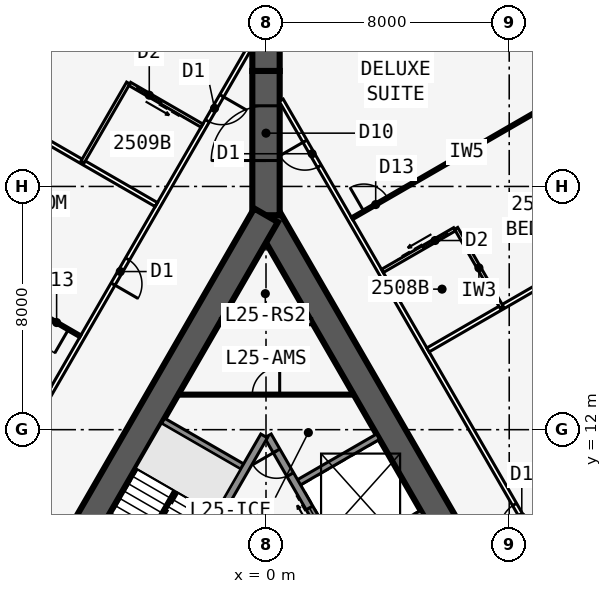
"""IFC4 building model, lengths in metres.
Left out: names, types, materials, properties, quantities, classifications, styles, units other than length and angle.
Written with IfcOpenShell. Run it as: python <this file> out.ifc"""

import sys

from ifc_helpers import new_model, si_unit, direction, frame, frame_2d, origin, place, context, subcontext, project, spatial, rectangle, extrude, element, fill, save


model = new_model("IFC4")
c1 = context("Model", 3, precision=1e-05, world=origin(), true_north=direction((0.0, 1.0)))
c2 = subcontext(c1, "Body", "Model", "MODEL_VIEW")
j1 = project(units=[si_unit("LENGTHUNIT", "METRE"), si_unit("PLANEANGLEUNIT", "RADIAN")], contexts=[c1])
p1 = place(None, origin())
s1 = spatial("IfcSite", under=j1, at=p1, CompositionType="ELEMENT")
p2 = place(p1, origin())
s2 = spatial("IfcBuilding", under=s1, at=p2, CompositionType="ELEMENT")
p3 = place(p2, frame((0.0, 0.0, 96.5)))
s3 = spatial("IfcBuildingStorey", under=s2, at=p3, CompositionType="ELEMENT", Elevation=96.5)
p4 = place(p3, frame((16.5, -9.526, 0.0), z_axis=(0.0, 0.0, 1.0), x_axis=(-0.499999749417, 0.866025548458, 0.0)))
e1 = element("IfcWall", 1, at=p4, inside=s3, PredefinedType="SHEAR", context=c2, shape_type="SweptSolid", body=[
    extrude(rectangle(XDim=33.0, YDim=0.9, at=frame_2d((16.5, 0.0))), origin(), (0.0, 0.0, 1.0), 3.4),
])
p5 = place(p4, frame((14.15, 0.0, 0.0)))
e2 = element("IfcOpeningElement", 2, at=p5, cuts=e1, PredefinedType="OPENING", context=c2, shape_type="SweptSolid", body=[
    extrude(rectangle(XDim=1.8, YDim=2.13, at=frame_2d((0.9, 1.065))), frame((0.0, 0.46, 0.0), z_axis=(0.0, -1.0, 0.0), x_axis=(1.0, 0.0, 0.0)), (0.0, 0.0, 1.0), 0.92),
])
p6 = place(p4, frame((12.6, 0.0, 0.0)))
e3 = element("IfcOpeningElement", 3, at=p6, cuts=e1, PredefinedType="OPENING", context=c2, shape_type="SweptSolid", body=[
    extrude(rectangle(XDim=1.0, YDim=2.13, at=frame_2d((0.5, 1.065))), frame((0.0, 0.46, 0.0), z_axis=(0.0, -1.0, 0.0), x_axis=(1.0, 0.0, 0.0)), (0.0, 0.0, 1.0), 0.92),
])
p7 = place(p3, frame((5.379, 2.586, 0.0), z_axis=(0.0, 0.0, 1.0), x_axis=(-0.500001375892, 0.866024609411, 0.0)))
e4 = element("IfcWall", 4, at=p7, inside=s3, PredefinedType="SOLIDWALL", context=c2, shape_type="SweptSolid", body=[
    extrude(rectangle(XDim=10.633, YDim=0.25, at=frame_2d((5.316, 0.0))), origin(), (0.0, 0.0, 1.0), 3.235),
])
p8 = place(p7, frame((9.164, 0.0, 0.0)))
e5 = element("IfcOpeningElement", 5, at=p8, cuts=e4, PredefinedType="OPENING", context=c2, shape_type="SweptSolid", body=[
    extrude(rectangle(XDim=0.9, YDim=2.13, at=frame_2d((0.45, 1.065))), frame((0.0, 0.135, 0.0), z_axis=(0.0, -1.0, 0.0), x_axis=(1.0, 0.0, 0.0)), (0.0, 0.0, 1.0), 0.27),
])
p9 = place(p7, frame((1.0, 0.0, 0.0)))
e6 = element("IfcOpeningElement", 6, at=p9, cuts=e4, PredefinedType="OPENING", context=c2, shape_type="SweptSolid", body=[
    extrude(rectangle(XDim=1.1, YDim=2.13, at=frame_2d((0.55, 1.065))), frame((0.0, 0.135, 0.0), z_axis=(0.0, -1.0, 0.0), x_axis=(1.0, 0.0, 0.0)), (0.0, 0.0, 1.0), 0.27),
])
p10 = place(p7, frame((3.9, 0.0, 0.0)))
e7 = element("IfcOpeningElement", 7, at=p10, cuts=e4, PredefinedType="OPENING", context=c2, shape_type="SweptSolid", body=[
    extrude(rectangle(XDim=1.1, YDim=2.13, at=frame_2d((0.55, 1.065))), frame((0.0, 0.135, 0.0), z_axis=(0.0, -1.0, 0.0), x_axis=(1.0, 0.0, 0.0)), (0.0, 0.0, 1.0), 0.27),
])
p11 = place(p7, frame((6.8, 0.0, 0.0)))
e8 = element("IfcOpeningElement", 8, at=p11, cuts=e4, PredefinedType="OPENING", context=c2, shape_type="SweptSolid", body=[
    extrude(rectangle(XDim=1.1, YDim=2.13, at=frame_2d((0.55, 1.065))), frame((0.0, 0.135, 0.0), z_axis=(0.0, -1.0, 0.0), x_axis=(1.0, 0.0, 0.0)), (0.0, 0.0, 1.0), 0.27),
])
for number, where, z_axis, x_axis in (
    (9, (2.429, 7.696, 0.0), (0.0, 0.0, 1.0), (0.866, 0.5, 0.0)),
    (10, (0.979, 10.207, 0.0), (0.0, 0.0, 1.0), (0.866, 0.5, 0.0)),
):
    element("IfcWall", number, at=place(p3, frame(where, z_axis=z_axis, x_axis=x_axis)), inside=s3, PredefinedType="SOLIDWALL", context=c2, shape_type="SweptSolid", body=[
        extrude(rectangle(XDim=3.125, YDim=0.2, at=frame_2d((1.562, 0.0))), origin(), (0.0, 0.0, 1.0), 3.235),
    ])
p12 = place(p3, frame((0.0, 19.052, 0.0), z_axis=(0.0, 0.0, 1.0), x_axis=(-0.499999749417, -0.866025548458, 0.0)))
e11 = element("IfcWall", 11, at=p12, inside=s3, PredefinedType="SHEAR", context=c2, shape_type="SweptSolid", body=[
    extrude(rectangle(XDim=33.0, YDim=0.9, at=frame_2d((16.5, 0.0))), origin(), (0.0, 0.0, 1.0), 3.4),
])
p13 = place(p12, frame((14.15, 0.0, 0.0)))
e12 = element("IfcOpeningElement", 12, at=p13, cuts=e11, PredefinedType="OPENING", context=c2, shape_type="SweptSolid", body=[
    extrude(rectangle(XDim=1.8, YDim=2.13, at=frame_2d((0.9, 1.065))), frame((0.0, 0.46, 0.0), z_axis=(0.0, -1.0, 0.0), x_axis=(1.0, 0.0, 0.0)), (0.0, 0.0, 1.0), 0.92),
])
p14 = place(p12, frame((12.6, 0.0, 0.0)))
e13 = element("IfcOpeningElement", 13, at=p14, cuts=e11, PredefinedType="OPENING", context=c2, shape_type="SweptSolid", body=[
    extrude(rectangle(XDim=1.0, YDim=2.13, at=frame_2d((0.5, 1.065))), frame((0.0, 0.46, 0.0), z_axis=(0.0, -1.0, 0.0), x_axis=(1.0, 0.0, 0.0)), (0.0, 0.0, 1.0), 0.92),
])
p15 = place(p3, frame((-0.062, 11.794, 0.0), z_axis=(0.0, 0.0, 1.0), x_axis=(-0.500006680225, -0.86602154692, 0.0)))
e14 = element("IfcWall", 14, at=p15, inside=s3, PredefinedType="SOLIDWALL", context=c2, shape_type="SweptSolid", body=[
    extrude(rectangle(XDim=7.733, YDim=0.25, at=frame_2d((3.866, 0.0))), origin(), (0.0, 0.0, 1.0), 3.235),
])
p16 = place(p3, frame((-0.679, 10.727, 0.0), z_axis=(0.0, 0.0, 1.0), x_axis=(-0.866022959057, 0.500004234368, 0.0)))
e15 = element("IfcWall", 15, at=p16, inside=s3, PredefinedType="SOLIDWALL", context=c2, shape_type="SweptSolid", body=[
    extrude(rectangle(XDim=3.125, YDim=0.2, at=frame_2d((1.562, 0.0))), origin(), (0.0, 0.0, 1.0), 3.235),
])
p17 = place(p3, frame((0.0, 19.052, 0.0), z_axis=(0.0, 0.0, 1.0), x_axis=(0.0, 1.0, 0.0)))
e16 = element("IfcWall", 16, at=p17, inside=s3, PredefinedType="SHEAR", context=c2, shape_type="SweptSolid", body=[
    extrude(rectangle(XDim=4.746, YDim=0.9, at=frame_2d((2.373, 0.0))), origin(), (0.0, 0.0, 1.0), 3.4),
])
p18 = place(p17, frame((1.8, 0.0, 0.0)))
e17 = element("IfcOpeningElement", 17, at=p18, cuts=e16, PredefinedType="OPENING", context=c2, shape_type="SweptSolid", body=[
    extrude(rectangle(XDim=1.8, YDim=2.13, at=frame_2d((0.9, 1.065))), frame((0.0, 0.46, 0.0), z_axis=(0.0, -1.0, 0.0), x_axis=(1.0, 0.0, 0.0)), (0.0, 0.0, 1.0), 0.92),
])
p19 = place(p3, frame((0.0, 23.799, 0.0), z_axis=(0.0, 0.0, 1.0), x_axis=(0.0, 1.0, 0.0)))
e18 = element("IfcWall", 18, at=p19, inside=s3, PredefinedType="SHEAR", context=c2, shape_type="SweptSolid", body=[
    extrude(rectangle(XDim=1.155, YDim=0.9, at=frame_2d((0.577, 0.0))), origin(), (0.0, 0.0, 1.0), 3.4),
])
p20 = place(p3, frame((10.511, 23.357, 0.0), z_axis=(0.0, 0.0, 1.0), x_axis=(-0.682289646561, 0.731081964075, 0.0)))
e19 = element("IfcWall", 19, at=p20, inside=s3, PredefinedType="STANDARD", context=c2, shape_type="SweptSolid", body=[
    extrude(rectangle(XDim=8.211, YDim=0.25, at=frame_2d((4.105, 0.0))), origin(), (0.0, 0.0, 1.0), 3.235),
])
p21 = place(p20, frame((2.006, 0.0, 0.45)))
e20 = element("IfcOpeningElement", 20, at=p21, cuts=e19, PredefinedType="OPENING", context=c2, shape_type="SweptSolid", body=[
    extrude(rectangle(XDim=4.2, YDim=2.4, at=frame_2d((2.1, 1.2))), frame((0.0, 0.135, 0.0), z_axis=(0.0, -1.0, 0.0), x_axis=(1.0, 0.0, 0.0)), (0.0, 0.0, 1.0), 0.27),
])
p22 = place(p3, frame((-4.909, 29.36, 0.0), z_axis=(0.0, 0.0, 1.0), x_axis=(-0.682289646561, -0.731081964075, 0.0)))
e21 = element("IfcWall", 21, at=p22, inside=s3, PredefinedType="STANDARD", context=c2, shape_type="SweptSolid", body=[
    extrude(rectangle(XDim=8.211, YDim=0.25, at=frame_2d((4.105, 0.0))), origin(), (0.0, 0.0, 1.0), 3.235),
])
p23 = place(p22, frame((2.006, 0.0, 0.45)))
e22 = element("IfcOpeningElement", 22, at=p23, cuts=e21, PredefinedType="OPENING", context=c2, shape_type="SweptSolid", body=[
    extrude(rectangle(XDim=4.2, YDim=2.4, at=frame_2d((2.1, 1.2))), frame((0.0, 0.135, 0.0), z_axis=(0.0, -1.0, 0.0), x_axis=(1.0, 0.0, 0.0)), (0.0, 0.0, 1.0), 0.27),
])
p24 = place(p3, frame((20.027, -10.985, 0.0), z_axis=(0.0, 0.0, 1.0), x_axis=(-0.500001677587, 0.866024435227, 0.0)))
e23 = element("IfcWall", 23, at=p24, inside=s3, PredefinedType="PARTITIONING", context=c2, shape_type="SweptSolid", body=[
    extrude(rectangle(XDim=39.054, YDim=0.15, at=frame_2d((19.527, 0.0))), origin(), (0.0, 0.0, 1.0), 3.235),
])
p25 = place(p24, frame((1.558, 0.0, 0.0)))
e24 = element("IfcOpeningElement", 24, at=p25, cuts=e23, PredefinedType="OPENING", context=c2, shape_type="SweptSolid", body=[
    extrude(rectangle(XDim=0.95, YDim=2.13, at=frame_2d((0.475, 1.065))), frame((0.0, 0.085, 0.0), z_axis=(0.0, -1.0, 0.0), x_axis=(1.0, 0.0, 0.0)), (0.0, 0.0, 1.0), 0.17),
])
p26 = place(p24, frame((11.552, 0.0, 0.0)))
e25 = element("IfcOpeningElement", 25, at=p26, cuts=e23, PredefinedType="OPENING", context=c2, shape_type="SweptSolid", body=[
    extrude(rectangle(XDim=0.95, YDim=2.13, at=frame_2d((0.475, 1.065))), frame((0.0, 0.085, 0.0), z_axis=(0.0, -1.0, 0.0), x_axis=(1.0, 0.0, 0.0)), (0.0, 0.0, 1.0), 0.17),
])
p27 = place(p24, frame((22.752, 0.0, 0.0)))
e26 = element("IfcOpeningElement", 26, at=p27, cuts=e23, PredefinedType="OPENING", context=c2, shape_type="SweptSolid", body=[
    extrude(rectangle(XDim=0.95, YDim=2.13, at=frame_2d((0.475, 1.065))), frame((0.0, 0.085, 0.0), z_axis=(0.0, -1.0, 0.0), x_axis=(1.0, 0.0, 0.0)), (0.0, 0.0, 1.0), 0.17),
])
p28 = place(p24, frame((36.546, 0.0, 0.0)))
e27 = element("IfcOpeningElement", 27, at=p28, cuts=e23, PredefinedType="OPENING", context=c2, shape_type="SweptSolid", body=[
    extrude(rectangle(XDim=0.95, YDim=2.13, at=frame_2d((0.475, 1.065))), frame((0.0, 0.085, 0.0), z_axis=(0.0, -1.0, 0.0), x_axis=(1.0, 0.0, 0.0)), (0.0, 0.0, 1.0), 0.17),
])
p29 = place(p3, frame((5.329, 14.623, 0.0), z_axis=(0.0, 0.0, 1.0), x_axis=(0.866018409083, 0.500012114982, 0.0)))
e28 = element("IfcWall", 28, at=p29, inside=s3, PredefinedType="PARTITIONING", context=c2, shape_type="SweptSolid", body=[
    extrude(rectangle(XDim=9.485, YDim=0.15, at=frame_2d((4.742, 0.0))), origin(), (0.0, 0.0, 1.0), 2.389),
])
p30 = place(p3, frame((2.829, 18.954, 0.0), z_axis=(0.0, 0.0, 1.0), x_axis=(0.866020536561, 0.500008430184, 0.0)))
e29 = element("IfcWall", 29, at=p30, inside=s3, PredefinedType="PARTITIONING", context=c2, shape_type="SweptSolid", body=[
    extrude(rectangle(XDim=8.72, YDim=0.1, at=frame_2d((4.36, 0.0))), origin(), (0.0, 0.0, 1.0), 2.389),
])
p31 = place(p30, frame((0.45, 0.0, 0.0)))
e30 = element("IfcOpeningElement", 30, at=p31, cuts=e29, PredefinedType="OPENING", context=c2, shape_type="SweptSolid", body=[
    extrude(rectangle(XDim=0.9, YDim=2.13, at=frame_2d((0.45, 1.065))), frame((0.0, 0.06, 0.0), z_axis=(0.0, -1.0, 0.0), x_axis=(1.0, 0.0, 0.0)), (0.0, 0.0, 1.0), 0.12),
])
p32 = place(p3, frame((7.753, 16.023, 0.0), z_axis=(0.0, 0.0, 1.0), x_axis=(-0.499990139034, 0.866031096941, 0.0)))
e31 = element("IfcWall", 31, at=p32, inside=s3, PredefinedType="PLUMBINGWALL", context=c2, shape_type="SweptSolid", body=[
    extrude(rectangle(XDim=3.0, YDim=0.12, at=frame_2d((1.5, 0.0))), origin(), (0.0, 0.0, 1.0), 3.235),
])
p33 = place(p3, frame((3.829, 17.221, 0.0), z_axis=(0.0, 0.0, 1.0), x_axis=(0.865997131366, 0.500048966069, 0.0)))
e32 = element("IfcWall", 32, at=p33, inside=s3, PredefinedType="PLUMBINGWALL", context=c2, shape_type="SweptSolid", body=[
    extrude(rectangle(XDim=2.74, YDim=0.12, at=frame_2d((1.37, 0.0))), origin(), (0.0, 0.0, 1.0), 3.235),
])
p34 = place(p33, frame((1.55, 0.0, 0.0)))
e33 = element("IfcOpeningElement", 33, at=p34, cuts=e32, PredefinedType="OPENING", context=c2, shape_type="SweptSolid", body=[
    extrude(rectangle(XDim=0.9, YDim=2.13, at=frame_2d((0.45, 1.065))), frame((0.0, 0.07, 0.0), z_axis=(0.0, -1.0, 0.0), x_axis=(1.0, 0.0, 0.0)), (0.0, 0.0, 1.0), 0.14),
])
p35 = place(p3, frame((-0.5, 24.636, 0.0), z_axis=(0.0, 0.0, 1.0), x_axis=(-0.500001915564, -0.86602429783, 0.0)))
e34 = element("IfcWall", 34, at=p35, inside=s3, PredefinedType="PARTITIONING", context=c2, shape_type="SweptSolid", body=[
    extrude(rectangle(XDim=42.172, YDim=0.15, at=frame_2d((21.086, 0.0))), origin(), (0.0, 0.0, 1.0), 3.235),
])
p36 = place(p35, frame((1.911, 0.0, 0.0)))
e35 = element("IfcOpeningElement", 35, at=p36, cuts=e34, PredefinedType="OPENING", context=c2, shape_type="SweptSolid", body=[
    extrude(rectangle(XDim=0.95, YDim=2.13, at=frame_2d((0.475, 1.065))), frame((0.0, 0.085, 0.0), z_axis=(0.0, -1.0, 0.0), x_axis=(1.0, 0.0, 0.0)), (0.0, 0.0, 1.0), 0.17),
])
p37 = place(p35, frame((8.111, 0.0, 0.0)))
e36 = element("IfcOpeningElement", 36, at=p37, cuts=e34, PredefinedType="OPENING", context=c2, shape_type="SweptSolid", body=[
    extrude(rectangle(XDim=0.95, YDim=2.13, at=frame_2d((0.475, 1.065))), frame((0.0, 0.085, 0.0), z_axis=(0.0, -1.0, 0.0), x_axis=(1.0, 0.0, 0.0)), (0.0, 0.0, 1.0), 0.17),
])
p38 = place(p35, frame((18.111, 0.0, 0.0)))
e37 = element("IfcOpeningElement", 37, at=p38, cuts=e34, PredefinedType="OPENING", context=c2, shape_type="SweptSolid", body=[
    extrude(rectangle(XDim=0.95, YDim=2.13, at=frame_2d((0.475, 1.065))), frame((0.0, 0.085, 0.0), z_axis=(0.0, -1.0, 0.0), x_axis=(1.0, 0.0, 0.0)), (0.0, 0.0, 1.0), 0.17),
])
p39 = place(p35, frame((28.711, 0.0, 0.0)))
e38 = element("IfcOpeningElement", 38, at=p39, cuts=e34, PredefinedType="OPENING", context=c2, shape_type="SweptSolid", body=[
    extrude(rectangle(XDim=0.95, YDim=2.13, at=frame_2d((0.475, 1.065))), frame((0.0, 0.085, 0.0), z_axis=(0.0, -1.0, 0.0), x_axis=(1.0, 0.0, 0.0)), (0.0, 0.0, 1.0), 0.17),
])
p40 = place(p35, frame((33.711, 0.0, 0.0)))
e39 = element("IfcOpeningElement", 39, at=p40, cuts=e34, PredefinedType="OPENING", context=c2, shape_type="SweptSolid", body=[
    extrude(rectangle(XDim=0.95, YDim=2.13, at=frame_2d((0.475, 1.065))), frame((0.0, 0.085, 0.0), z_axis=(0.0, -1.0, 0.0), x_axis=(1.0, 0.0, 0.0)), (0.0, 0.0, 1.0), 0.17),
])
p41 = place(p35, frame((39.311, 0.0, 0.0)))
e40 = element("IfcOpeningElement", 40, at=p41, cuts=e34, PredefinedType="OPENING", context=c2, shape_type="SweptSolid", body=[
    extrude(rectangle(XDim=0.95, YDim=2.13, at=frame_2d((0.475, 1.065))), frame((0.0, 0.085, 0.0), z_axis=(0.0, -1.0, 0.0), x_axis=(1.0, 0.0, 0.0)), (0.0, 0.0, 1.0), 0.17),
])
p42 = place(p3, frame((-3.608, 19.404, 0.0), z_axis=(0.0, 0.0, 1.0), x_axis=(-0.866021300503, 0.500007107024, 0.0)))
e41 = element("IfcWall", 41, at=p42, inside=s3, PredefinedType="PARTITIONING", context=c2, shape_type="SweptSolid", body=[
    extrude(rectangle(XDim=7.82, YDim=0.15, at=frame_2d((3.91, 0.0))), origin(), (0.0, 0.0, 1.0), 2.389),
])
p43 = place(p3, frame((-6.108, 15.073, 0.0), z_axis=(0.0, 0.0, 1.0), x_axis=(-0.866031196456, 0.499989966665, 0.0)))
e42 = element("IfcWall", 42, at=p43, inside=s3, PredefinedType="PARTITIONING", context=c2, shape_type="SweptSolid", body=[
    extrude(rectangle(XDim=8.585, YDim=0.1, at=frame_2d((4.292, 0.0))), origin(), (0.0, 0.0, 1.0), 2.389),
])
p44 = place(p43, frame((0.45, 0.0, 0.0)))
e43 = element("IfcOpeningElement", 43, at=p44, cuts=e42, PredefinedType="OPENING", context=c2, shape_type="SweptSolid", body=[
    extrude(rectangle(XDim=0.9, YDim=2.13, at=frame_2d((0.45, 1.065))), frame((0.0, 0.06, 0.0), z_axis=(0.0, -1.0, 0.0), x_axis=(1.0, 0.0, 0.0)), (0.0, 0.0, 1.0), 0.12),
])
p45 = place(p3, frame((-4.533, 23.402, 0.0), z_axis=(0.0, 0.0, 1.0), x_axis=(-0.499990139034, -0.866031096941, 0.0)))
e44 = element("IfcWall", 44, at=p45, inside=s3, PredefinedType="PLUMBINGWALL", context=c2, shape_type="SweptSolid", body=[
    extrude(rectangle(XDim=3.0, YDim=0.12, at=frame_2d((1.5, 0.0))), origin(), (0.0, 0.0, 1.0), 3.235),
])
p46 = place(p3, frame((-2.108, 22.002, 0.0), z_axis=(0.0, 0.0, 1.0), x_axis=(-0.866035715982, 0.499982138324, 0.0)))
e45 = element("IfcWall", 45, at=p46, inside=s3, PredefinedType="PLUMBINGWALL", context=c2, shape_type="SweptSolid", body=[
    extrude(rectangle(XDim=2.74, YDim=0.12, at=frame_2d((1.37, 0.0))), origin(), (0.0, 0.0, 1.0), 3.235),
])
p47 = place(p46, frame((1.55, 0.0, 0.0)))
e46 = element("IfcOpeningElement", 46, at=p47, cuts=e45, PredefinedType="OPENING", context=c2, shape_type="SweptSolid", body=[
    extrude(rectangle(XDim=0.9, YDim=2.13, at=frame_2d((0.45, 1.065))), frame((0.0, 0.07, 0.0), z_axis=(0.0, -1.0, 0.0), x_axis=(1.0, 0.0, 0.0)), (0.0, 0.0, 1.0), 0.14),
])
p48 = place(p3, frame((-1.501, 15.552, 0.0), z_axis=(0.0, 0.0, 1.0), x_axis=(1.0, 0.0, 0.0)))
e47 = element("IfcWall", 47, at=p48, inside=s3, PredefinedType="SOLIDWALL", context=c2, shape_type="SweptSolid", body=[
    extrude(rectangle(XDim=3.002, YDim=0.2, at=frame_2d((1.501, 0.0))), origin(), (0.0, 0.0, 1.0), 3.235),
])
p49 = place(p3, frame((-2.887, 13.153, 0.0), z_axis=(0.0, 0.0, 1.0), x_axis=(1.0, 0.0, 0.0)))
e48 = element("IfcWall", 48, at=p49, inside=s3, PredefinedType="PARTITIONING", context=c2, shape_type="SweptSolid", body=[
    extrude(rectangle(XDim=5.773, YDim=0.1, at=frame_2d((2.887, 0.0))), origin(), (0.0, 0.0, 1.0), 3.235),
])
p50 = place(p49, frame((2.437, 0.0, 0.0)))
e49 = element("IfcOpeningElement", 49, at=p50, cuts=e48, PredefinedType="OPENING", context=c2, shape_type="SweptSolid", body=[
    extrude(rectangle(XDim=0.9, YDim=2.13, at=frame_2d((0.45, 1.065))), frame((0.0, 0.06, 0.0), z_axis=(0.0, -1.0, 0.0), x_axis=(1.0, 0.0, 0.0)), (0.0, 0.0, 1.0), 0.12),
])
p51 = place(p3, frame((-2.988, 9.978, 0.0), z_axis=(0.0, 0.0, 1.0), x_axis=(-0.499992232847, -0.866029888106, 0.0)))
e50 = element("IfcWall", 50, at=p51, inside=s3, PredefinedType="SOLIDWALL", context=c2, shape_type="SweptSolid", body=[
    extrude(rectangle(XDim=2.794, YDim=0.1, at=frame_2d((1.397, 0.0))), origin(), (0.0, 0.0, 1.0), 3.4),
])
p52 = place(p31, origin())
e51 = element("IfcDoor", 51, at=p52, inside=s3, OperationType="SINGLE_SWING_LEFT", PredefinedType="DOOR", context=c2, shape_type="SweptSolid", body=[
    extrude(rectangle(XDim=0.9, YDim=2.13, at=frame_2d((0.45, 1.065))), frame((0.0, 0.025, 0.0), z_axis=(0.0, -1.0, 0.0), x_axis=(1.0, 0.0, 0.0)), (0.0, 0.0, 1.0), 0.05),
])
fill(e30, e51)
p53 = place(p27, origin())
e52 = element("IfcDoor", 52, at=p53, inside=s3, OperationType="SINGLE_SWING_LEFT", PredefinedType="DOOR", context=c2, shape_type="SweptSolid", body=[
    extrude(rectangle(XDim=0.95, YDim=2.13, at=frame_2d((0.475, 1.065))), frame((0.0, 0.025, 0.0), z_axis=(0.0, -1.0, 0.0), x_axis=(1.0, 0.0, 0.0)), (0.0, 0.0, 1.0), 0.05),
])
fill(e26, e52)
p54 = place(p34, origin())
e53 = element("IfcDoor", 53, at=p54, inside=s3, OperationType="SLIDING_TO_LEFT", PredefinedType="DOOR", context=c2, shape_type="SweptSolid", body=[
    extrude(rectangle(XDim=0.9, YDim=2.13, at=frame_2d((0.45, 1.065))), frame((0.0, 0.025, 0.0), z_axis=(0.0, -1.0, 0.0), x_axis=(1.0, 0.0, 0.0)), (0.0, 0.0, 1.0), 0.05),
])
fill(e33, e53)
p55 = place(p28, origin())
e54 = element("IfcDoor", 54, at=p55, inside=s3, OperationType="SINGLE_SWING_RIGHT", PredefinedType="DOOR", context=c2, shape_type="SweptSolid", body=[
    extrude(rectangle(XDim=0.95, YDim=2.13, at=frame_2d((0.475, 1.065))), frame((0.0, 0.025, 0.0), z_axis=(0.0, -1.0, 0.0), x_axis=(1.0, 0.0, 0.0)), (0.0, 0.0, 1.0), 0.05),
])
fill(e27, e54)
p56 = place(p44, origin())
e55 = element("IfcDoor", 55, at=p56, inside=s3, OperationType="SINGLE_SWING_LEFT", PredefinedType="DOOR", context=c2, shape_type="SweptSolid", body=[
    extrude(rectangle(XDim=0.9, YDim=2.13, at=frame_2d((0.45, 1.065))), frame((0.0, 0.025, 0.0), z_axis=(0.0, -1.0, 0.0), x_axis=(1.0, 0.0, 0.0)), (0.0, 0.0, 1.0), 0.05),
])
fill(e43, e55)
p57 = place(p47, origin())
e56 = element("IfcDoor", 56, at=p57, inside=s3, OperationType="SLIDING_TO_LEFT", PredefinedType="DOOR", context=c2, shape_type="SweptSolid", body=[
    extrude(rectangle(XDim=0.9, YDim=2.13, at=frame_2d((0.45, 1.065))), frame((0.0, 0.025, 0.0), z_axis=(0.0, -1.0, 0.0), x_axis=(1.0, 0.0, 0.0)), (0.0, 0.0, 1.0), 0.05),
])
fill(e46, e56)
p58 = place(p36, origin())
e57 = element("IfcDoor", 57, at=p58, inside=s3, OperationType="SINGLE_SWING_LEFT", PredefinedType="DOOR", context=c2, shape_type="SweptSolid", body=[
    extrude(rectangle(XDim=0.95, YDim=2.13, at=frame_2d((0.475, 1.065))), frame((0.0, 0.025, 0.0), z_axis=(0.0, -1.0, 0.0), x_axis=(1.0, 0.0, 0.0)), (0.0, 0.0, 1.0), 0.05),
])
fill(e35, e57)
p59 = place(p37, origin())
e58 = element("IfcDoor", 58, at=p59, inside=s3, OperationType="SINGLE_SWING_RIGHT", PredefinedType="DOOR", context=c2, shape_type="SweptSolid", body=[
    extrude(rectangle(XDim=0.95, YDim=2.13, at=frame_2d((0.475, 1.065))), frame((0.0, 0.025, 0.0), z_axis=(0.0, -1.0, 0.0), x_axis=(1.0, 0.0, 0.0)), (0.0, 0.0, 1.0), 0.05),
])
fill(e36, e58)
p60 = place(p18, origin())
e59 = element("IfcDoor", 59, at=p60, inside=s3, OperationType="DOUBLE_DOOR_DOUBLE_SWING", PredefinedType="DOOR", context=c2, shape_type="SweptSolid", body=[
    extrude(rectangle(XDim=1.8, YDim=2.13, at=frame_2d((0.9, 1.065))), frame((0.0, 0.025, 0.0), z_axis=(0.0, -1.0, 0.0), x_axis=(1.0, 0.0, 0.0)), (0.0, 0.0, 1.0), 0.05),
])
fill(e17, e59)
p61 = place(p50, origin())
e60 = element("IfcDoor", 60, at=p61, inside=s3, OperationType="SINGLE_SWING_RIGHT", PredefinedType="DOOR", context=c2, shape_type="SweptSolid", body=[
    extrude(rectangle(XDim=0.9, YDim=2.13, at=frame_2d((0.45, 1.065))), frame((0.0, 0.025, 0.0), z_axis=(0.0, -1.0, 0.0), x_axis=(1.0, 0.0, 0.0)), (0.0, 0.0, 1.0), 0.05),
])
fill(e49, e60)
p62 = place(p8, origin())
e61 = element("IfcDoor", 61, at=p62, inside=s3, OperationType="SINGLE_SWING_RIGHT", PredefinedType="DOOR", context=c2, shape_type="SweptSolid", body=[
    extrude(rectangle(XDim=0.9, YDim=2.13, at=frame_2d((0.45, 1.065))), frame((0.0, 0.025, 0.0), z_axis=(0.0, -1.0, 0.0), x_axis=(1.0, 0.0, 0.0)), (0.0, 0.0, 1.0), 0.05),
])
fill(e5, e61)
p63 = place(p11, origin())
e62 = element("IfcDoor", 62, at=p63, inside=s3, OperationType="DOUBLE_DOOR_SLIDING", PredefinedType="USERDEFINED", context=c2, shape_type="SweptSolid", body=[
    extrude(rectangle(XDim=1.1, YDim=2.13, at=frame_2d((0.55, 1.065))), frame((0.0, 0.025, 0.0), z_axis=(0.0, -1.0, 0.0), x_axis=(1.0, 0.0, 0.0)), (0.0, 0.0, 1.0), 0.05),
])
fill(e8, e62)
save(model, sys.argv[1])
